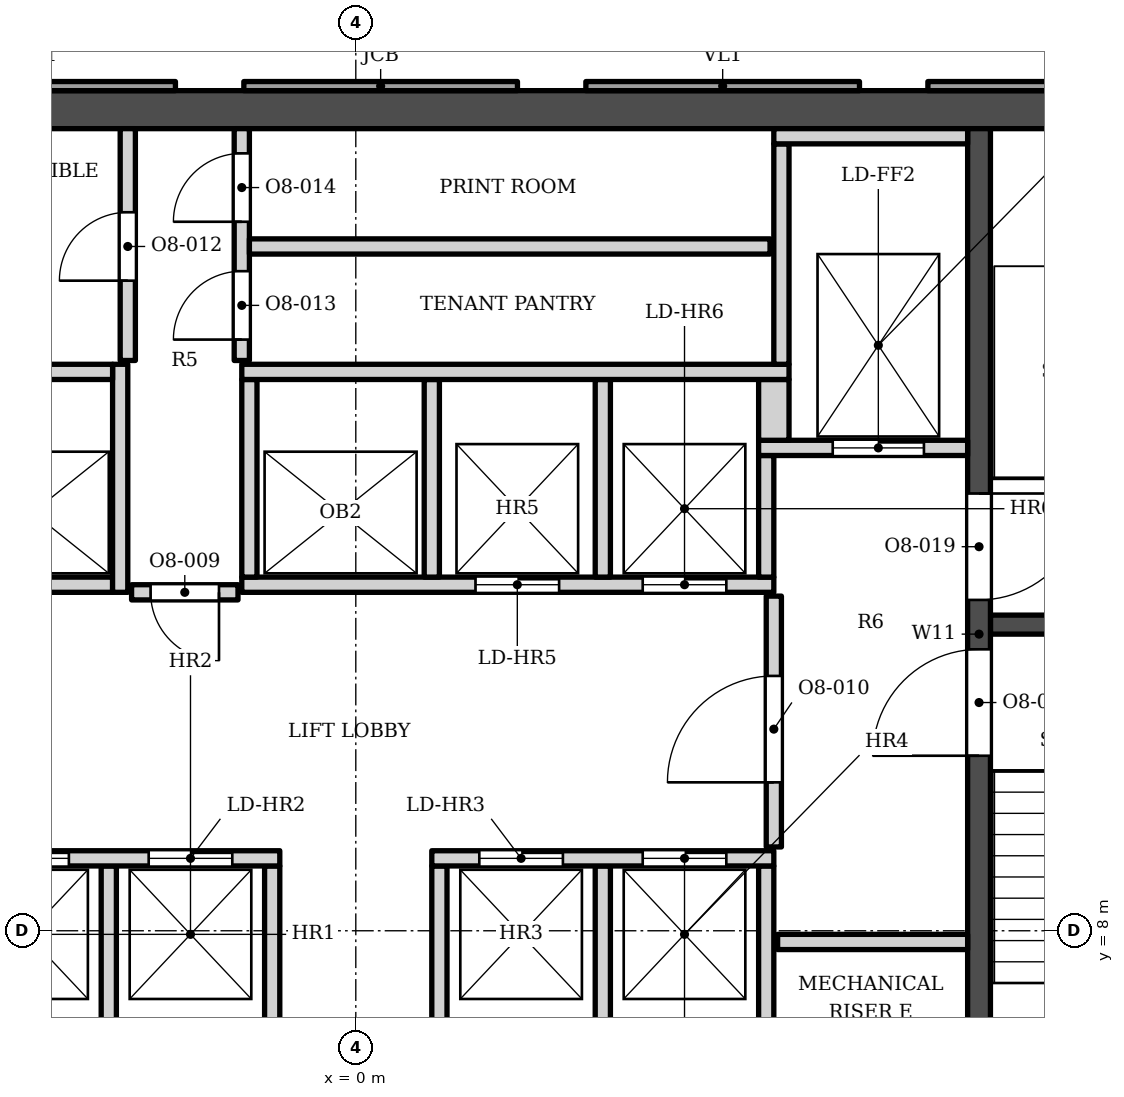
"""IFC4 building model, lengths in metres.
Left out: names, types, materials, properties, quantities, classifications, styles, units other than length and angle.
Written with IfcOpenShell. Run it as: python <this file> out.ifc"""

import sys

from ifc_helpers import new_model, si_unit, direction, frame, frame_2d, origin, place, context, subcontext, project, spatial, polyline, rectangle, outline, extrude, element, fill, save


model = new_model("IFC4")
c1 = context("Model", 3, precision=1e-05, world=origin(), true_north=direction((0.0, 1.0)))
c2 = subcontext(c1, "Body", "Model", "MODEL_VIEW")
j1 = project(units=[si_unit("LENGTHUNIT", "METRE"), si_unit("PLANEANGLEUNIT", "RADIAN")], contexts=[c1])
p1 = place(None, origin())
s1 = spatial("IfcSite", under=j1, at=p1, CompositionType="ELEMENT")
p2 = place(p1, origin())
s2 = spatial("IfcBuilding", under=s1, at=p2, CompositionType="ELEMENT")
p3 = place(p2, frame((0.0, 0.0, 231.5)))
s3 = spatial("IfcBuildingStorey", under=s2, at=p3, CompositionType="ELEMENT", Elevation=231.5)
p4 = place(p3, frame((-13.9, 18.802, 0.0), z_axis=(0.0, 0.0, 1.0), x_axis=(1.0, 0.0, 0.0)))
e1 = element("IfcWall", 1, at=p4, inside=s3, PredefinedType="SHEAR", context=c2, shape_type="SweptSolid", body=[
    extrude(rectangle(XDim=27.8, YDim=0.5, at=frame_2d((13.9, 0.0))), origin(), (0.0, 0.0, 1.0), 3.9),
])
p5 = place(p3, frame((8.2, 5.253, 0.0), z_axis=(0.0, 0.0, 1.0), x_axis=(0.0, 1.0, 0.0)))
e2 = element("IfcWall", 2, at=p5, inside=s3, PredefinedType="SHEAR", context=c2, shape_type="SweptSolid", body=[
    extrude(rectangle(XDim=13.3, YDim=0.3, at=frame_2d((6.65, 0.0))), origin(), (0.0, 0.0, 1.0), 3.9),
])
p6 = place(p5, frame((7.1, 0.0, 0.0)))
e3 = element("IfcOpeningElement", 3, at=p6, cuts=e2, PredefinedType="OPENING", context=c2, shape_type="SweptSolid", body=[
    extrude(rectangle(XDim=1.4, YDim=2.1, at=frame_2d((0.7, 1.05))), frame((0.0, 0.16, 0.0), z_axis=(0.0, -1.0, 0.0), x_axis=(1.0, 0.0, 0.0)), (0.0, 0.0, 1.0), 0.32),
])
p7 = place(p5, frame((5.05, 0.0, 0.0)))
e4 = element("IfcOpeningElement", 4, at=p7, cuts=e2, PredefinedType="OPENING", context=c2, shape_type="SweptSolid", body=[
    extrude(rectangle(XDim=1.4, YDim=2.1, at=frame_2d((0.7, 1.05))), frame((0.0, 0.16, 0.0), z_axis=(0.0, -1.0, 0.0), x_axis=(1.0, 0.0, 0.0)), (0.0, 0.0, 1.0), 0.32),
])
p8 = place(p3, frame((8.35, 12.028, 0.0), z_axis=(0.0, 0.0, 1.0), x_axis=(1.0, 0.0, 0.0)))
e5 = element("IfcWall", 5, at=p8, inside=s3, PredefinedType="SHEAR", context=c2, shape_type="SweptSolid", body=[
    extrude(rectangle(XDim=3.75, YDim=0.25, at=frame_2d((1.875, 0.0))), origin(), (0.0, 0.0, 1.0), 3.9),
])
p9 = place(p3, origin())
e6 = element("IfcWall", 6, at=p9, inside=s3, PredefinedType="SOLIDWALL", context=c2, shape_type="SweptSolid", body=[
    extrude(outline(polyline([(7.527, 19.173), (7.527, 19.052), (11.127, 19.052), (11.127, 19.173), (7.527, 19.173)])), origin(), (0.0, 0.0, 1.0), 3.0),
])
p10 = place(p3, origin())
e7 = element("IfcWall", 7, at=p10, inside=s3, PredefinedType="ELEMENTEDWALL", context=c2, shape_type="SweptSolid", body=[
    extrude(outline(polyline([(3.027, 19.173), (3.027, 19.052), (6.627, 19.052), (6.627, 19.173), (3.027, 19.173)])), origin(), (0.0, 0.0, 1.0), 3.0),
])
p11 = place(p3, origin())
e8 = element("IfcWall", 8, at=p11, inside=s3, PredefinedType="SOLIDWALL", context=c2, shape_type="SweptSolid", body=[
    extrude(outline(polyline([(-1.473, 19.173), (-1.473, 19.052), (2.127, 19.052), (2.127, 19.173), (-1.473, 19.173)])), origin(), (0.0, 0.0, 1.0), 3.0),
])
p12 = place(p3, origin())
e9 = element("IfcWall", 9, at=p12, inside=s3, PredefinedType="ELEMENTEDWALL", context=c2, shape_type="SweptSolid", body=[
    extrude(outline(polyline([(-5.973, 19.173), (-5.973, 19.052), (-2.373, 19.052), (-2.373, 19.173), (-5.973, 19.173)])), origin(), (0.0, 0.0, 1.0), 3.0),
])
for number, where, z_axis, x_axis in (
    (10, (-3.25, 6.353, 0.0), (0.0, 0.0, 1.0), (0.0, 1.0, 0.0)),
    (11, (-1.1, 6.353, 0.0), (0.0, 0.0, 1.0), (0.0, 1.0, 0.0)),
    (12, (1.1, 6.353, 0.0), (0.0, 0.0, 1.0), (0.0, 1.0, 0.0)),
    (13, (3.25, 6.353, 0.0), (0.0, 0.0, 1.0), (0.0, 1.0, 0.0)),
    (14, (5.4, 6.353, 0.0), (0.0, 0.0, 1.0), (0.0, 1.0, 0.0)),
    (15, (5.55, 7.853, 0.0), (0.0, 0.0, 1.0), (1.0, 0.0, 0.0)),
):
    element("IfcWall", number, at=place(p3, frame(where, z_axis=z_axis, x_axis=x_axis)), inside=s3, PredefinedType="SOLIDWALL", context=c2, shape_type="SweptSolid", body=[
        extrude(rectangle(XDim=2.5, YDim=0.2, at=frame_2d((1.25, 0.0))), origin(), (0.0, 0.0, 1.0), 3.73),
    ])
p13 = place(p3, frame((-5.5, 8.953, 0.0), z_axis=(0.0, 0.0, 1.0), x_axis=(1.0, 0.0, 0.0)))
e16 = element("IfcWall", 16, at=p13, inside=s3, PredefinedType="SOLIDWALL", context=c2, shape_type="SweptSolid", body=[
    extrude(rectangle(XDim=4.5, YDim=0.2, at=frame_2d((2.25, 0.0))), origin(), (0.0, 0.0, 1.0), 3.73),
])
p14 = place(p13, frame((0.625, 0.0, 0.0)))
e17 = element("IfcOpeningElement", 17, at=p14, cuts=e16, PredefinedType="OPENING", context=c2, shape_type="SweptSolid", body=[
    extrude(rectangle(XDim=1.1, YDim=2.1, at=frame_2d((0.55, 1.05))), frame((0.0, 0.11, 0.0), z_axis=(0.0, -1.0, 0.0), x_axis=(1.0, 0.0, 0.0)), (0.0, 0.0, 1.0), 0.22),
])
p15 = place(p13, frame((2.775, 0.0, 0.0)))
e18 = element("IfcOpeningElement", 18, at=p15, cuts=e16, PredefinedType="OPENING", context=c2, shape_type="SweptSolid", body=[
    extrude(rectangle(XDim=1.1, YDim=2.1, at=frame_2d((0.55, 1.05))), frame((0.0, 0.11, 0.0), z_axis=(0.0, -1.0, 0.0), x_axis=(1.0, 0.0, 0.0)), (0.0, 0.0, 1.0), 0.22),
])
p16 = place(p3, frame((1.0, 8.953, 0.0), z_axis=(0.0, 0.0, 1.0), x_axis=(1.0, 0.0, 0.0)))
e19 = element("IfcWall", 19, at=p16, inside=s3, PredefinedType="SOLIDWALL", context=c2, shape_type="SweptSolid", body=[
    extrude(rectangle(XDim=4.5, YDim=0.2, at=frame_2d((2.25, 0.0))), origin(), (0.0, 0.0, 1.0), 3.73),
])
p17 = place(p16, frame((0.625, 0.0, 0.0)))
e20 = element("IfcOpeningElement", 20, at=p17, cuts=e19, PredefinedType="OPENING", context=c2, shape_type="SweptSolid", body=[
    extrude(rectangle(XDim=1.1, YDim=2.1, at=frame_2d((0.55, 1.05))), frame((0.0, 0.11, 0.0), z_axis=(0.0, -1.0, 0.0), x_axis=(1.0, 0.0, 0.0)), (0.0, 0.0, 1.0), 0.22),
])
p18 = place(p16, frame((2.775, 0.0, 0.0)))
e21 = element("IfcOpeningElement", 21, at=p18, cuts=e19, PredefinedType="OPENING", context=c2, shape_type="SweptSolid", body=[
    extrude(rectangle(XDim=1.1, YDim=2.1, at=frame_2d((0.55, 1.05))), frame((0.0, 0.11, 0.0), z_axis=(0.0, -1.0, 0.0), x_axis=(1.0, 0.0, 0.0)), (0.0, 0.0, 1.0), 0.22),
])
p19 = place(p3, frame((5.5, 9.103, 0.0), z_axis=(0.0, 0.0, 1.0), x_axis=(0.0, 1.0, 0.0)))
e22 = element("IfcWall", 22, at=p19, inside=s3, PredefinedType="SOLIDWALL", context=c2, shape_type="SweptSolid", body=[
    extrude(rectangle(XDim=3.3, YDim=0.2, at=frame_2d((1.65, 0.0))), origin(), (0.0, 0.0, 1.0), 3.73),
])
p20 = place(p19, frame((0.85, 0.0, 0.0)))
e23 = element("IfcOpeningElement", 23, at=p20, cuts=e22, PredefinedType="OPENING", context=c2, shape_type="SweptSolid", body=[
    extrude(rectangle(XDim=1.4, YDim=2.1, at=frame_2d((0.7, 1.05))), frame((0.0, 0.11, 0.0), z_axis=(0.0, -1.0, 0.0), x_axis=(1.0, 0.0, 0.0)), (0.0, 0.0, 1.0), 0.22),
])
p21 = place(p3, frame((-2.95, 12.453, 0.0), z_axis=(0.0, 0.0, 1.0), x_axis=(1.0, 0.0, 0.0)))
e24 = element("IfcWall", 24, at=p21, inside=s3, PredefinedType="SOLIDWALL", context=c2, shape_type="SweptSolid", body=[
    extrude(rectangle(XDim=1.4, YDim=0.2, at=frame_2d((0.7, 0.0))), origin(), (0.0, 0.0, 1.0), 3.73),
])
p22 = place(p21, frame((0.25, 0.0, 0.0)))
e25 = element("IfcOpeningElement", 25, at=p22, cuts=e24, PredefinedType="OPENING", context=c2, shape_type="SweptSolid", body=[
    extrude(rectangle(XDim=0.9, YDim=2.1, at=frame_2d((0.45, 1.05))), frame((0.0, 0.11, 0.0), z_axis=(0.0, -1.0, 0.0), x_axis=(1.0, 0.0, 0.0)), (0.0, 0.0, 1.0), 0.22),
])
p23 = place(p3, frame((-5.3, 12.552, 0.0), z_axis=(0.0, 0.0, 1.0), x_axis=(1.0, 0.0, 0.0)))
e26 = element("IfcWall", 26, at=p23, inside=s3, PredefinedType="SOLIDWALL", context=c2, shape_type="SweptSolid", body=[
    extrude(rectangle(XDim=2.1, YDim=0.2, at=frame_2d((1.05, 0.0))), origin(), (0.0, 0.0, 1.0), 3.73),
])
p24 = place(p3, frame((-3.1, 12.453, 0.0), z_axis=(0.0, 0.0, 1.0), x_axis=(0.0, 1.0, 0.0)))
e27 = element("IfcWall", 27, at=p24, inside=s3, PredefinedType="SOLIDWALL", context=c2, shape_type="SweptSolid", body=[
    extrude(rectangle(XDim=3.0, YDim=0.2, at=frame_2d((1.5, 0.0))), origin(), (0.0, 0.0, 1.0), 3.73),
])
p25 = place(p3, frame((-1.5, 12.552, 0.0), z_axis=(0.0, 0.0, 1.0), x_axis=(1.0, 0.0, 0.0)))
e28 = element("IfcWall", 28, at=p25, inside=s3, PredefinedType="SOLIDWALL", context=c2, shape_type="SweptSolid", body=[
    extrude(rectangle(XDim=7.0, YDim=0.2, at=frame_2d((3.5, 0.0))), origin(), (0.0, 0.0, 1.0), 3.73),
])
p26 = place(p25, frame((3.075, 0.0, 0.0)))
e29 = element("IfcOpeningElement", 29, at=p26, cuts=e28, PredefinedType="OPENING", context=c2, shape_type="SweptSolid", body=[
    extrude(rectangle(XDim=1.1, YDim=2.1, at=frame_2d((0.55, 1.05))), frame((0.0, 0.11, 0.0), z_axis=(0.0, -1.0, 0.0), x_axis=(1.0, 0.0, 0.0)), (0.0, 0.0, 1.0), 0.22),
])
p27 = place(p25, frame((5.275, 0.0, 0.0)))
e30 = element("IfcOpeningElement", 30, at=p27, cuts=e28, PredefinedType="OPENING", context=c2, shape_type="SweptSolid", body=[
    extrude(rectangle(XDim=1.1, YDim=2.1, at=frame_2d((0.55, 1.05))), frame((0.0, 0.11, 0.0), z_axis=(0.0, -1.0, 0.0), x_axis=(1.0, 0.0, 0.0)), (0.0, 0.0, 1.0), 0.22),
])
for number, where, z_axis, x_axis in (
    (31, (-1.4, 12.653, 0.0), (0.0, 0.0, 1.0), (0.0, 1.0, 0.0)),
    (32, (1.0, 12.653, 0.0), (0.0, 0.0, 1.0), (0.0, 1.0, 0.0)),
    (33, (3.25, 12.653, 0.0), (0.0, 0.0, 1.0), (0.0, 1.0, 0.0)),
):
    element("IfcWall", number, at=place(p3, frame(where, z_axis=z_axis, x_axis=x_axis)), inside=s3, PredefinedType="SOLIDWALL", context=c2, shape_type="SweptSolid", body=[
        extrude(rectangle(XDim=2.6, YDim=0.2, at=frame_2d((1.3, 0.0))), origin(), (0.0, 0.0, 1.0), 3.73),
    ])
p28 = place(p3, frame((5.4, 12.653, 0.0), z_axis=(0.0, 0.0, 1.0), x_axis=(0.0, 1.0, 0.0)))
e34 = element("IfcWall", 34, at=p28, inside=s3, PredefinedType="SOLIDWALL", context=c2, shape_type="SweptSolid", body=[
    extrude(rectangle(XDim=1.6, YDim=0.2, at=frame_2d((0.8, 0.0))), origin(), (0.0, 0.0, 1.0), 3.73),
])
p29 = place(p3, frame((5.3, 14.353, 0.0), z_axis=(0.0, 0.0, 1.0), x_axis=(1.0, 0.0, 0.0)))
e35 = element("IfcWall", 35, at=p29, inside=s3, PredefinedType="SOLIDWALL", context=c2, shape_type="SweptSolid", body=[
    extrude(rectangle(XDim=2.75, YDim=0.2, at=frame_2d((1.375, 0.0))), origin(), (0.0, 0.0, 1.0), 3.73),
])
p30 = place(p29, frame((0.975, 0.0, 0.0)))
e36 = element("IfcOpeningElement", 36, at=p30, cuts=e35, PredefinedType="OPENING", context=c2, shape_type="SweptSolid", body=[
    extrude(rectangle(XDim=1.2, YDim=2.1, at=frame_2d((0.6, 1.05))), frame((0.0, 0.11, 0.0), z_axis=(0.0, -1.0, 0.0), x_axis=(1.0, 0.0, 0.0)), (0.0, 0.0, 1.0), 0.22),
])
p31 = place(p3, frame((5.5, 14.453, 0.0), z_axis=(0.0, 0.0, 1.0), x_axis=(0.0, 1.0, 0.0)))
e37 = element("IfcWall", 37, at=p31, inside=s3, PredefinedType="SOLIDWALL", context=c2, shape_type="SweptSolid", body=[
    extrude(rectangle(XDim=0.8, YDim=0.4, at=frame_2d((0.4, 0.0))), origin(), (0.0, 0.0, 1.0), 3.73),
])
p32 = place(p3, frame((-5.3, 15.353, 0.0), z_axis=(0.0, 0.0, 1.0), x_axis=(1.0, 0.0, 0.0)))
e38 = element("IfcWall", 38, at=p32, inside=s3, PredefinedType="SOLIDWALL", context=c2, shape_type="SweptSolid", body=[
    extrude(rectangle(XDim=2.1, YDim=0.2, at=frame_2d((1.05, 0.0))), origin(), (0.0, 0.0, 1.0), 3.73),
])
p33 = place(p3, frame((-1.5, 15.353, 0.0), z_axis=(0.0, 0.0, 1.0), x_axis=(1.0, 0.0, 0.0)))
e39 = element("IfcWall", 39, at=p33, inside=s3, PredefinedType="SOLIDWALL", context=c2, shape_type="SweptSolid", body=[
    extrude(rectangle(XDim=7.2, YDim=0.2, at=frame_2d((3.6, 0.0))), origin(), (0.0, 0.0, 1.0), 3.73),
])
p34 = place(p3, frame((5.6, 15.453, 0.0), z_axis=(0.0, 0.0, 1.0), x_axis=(0.0, 1.0, 0.0)))
e40 = element("IfcWall", 40, at=p34, inside=s3, PredefinedType="SOLIDWALL", context=c2, shape_type="SweptSolid", body=[
    extrude(rectangle(XDim=2.9, YDim=0.2, at=frame_2d((1.45, 0.0))), origin(), (0.0, 0.0, 1.0), 3.73),
])
p35 = place(p3, frame((-3.0, 15.503, 0.0), z_axis=(0.0, 0.0, 1.0), x_axis=(0.0, 1.0, 0.0)))
e41 = element("IfcWall", 41, at=p35, inside=s3, PredefinedType="SOLIDWALL", context=c2, shape_type="SweptSolid", body=[
    extrude(rectangle(XDim=3.05, YDim=0.2, at=frame_2d((1.525, 0.0))), origin(), (0.0, 0.0, 1.0), 3.73),
])
p36 = place(p35, frame((1.05, 0.0, 0.0)))
e42 = element("IfcOpeningElement", 42, at=p36, cuts=e41, PredefinedType="OPENING", context=c2, shape_type="SweptSolid", body=[
    extrude(rectangle(XDim=0.9, YDim=2.1, at=frame_2d((0.45, 1.05))), frame((0.0, 0.11, 0.0), z_axis=(0.0, -1.0, 0.0), x_axis=(1.0, 0.0, 0.0)), (0.0, 0.0, 1.0), 0.22),
])
p37 = place(p3, frame((-1.5, 15.503, 0.0), z_axis=(0.0, 0.0, 1.0), x_axis=(0.0, 1.0, 0.0)))
e43 = element("IfcWall", 43, at=p37, inside=s3, PredefinedType="SOLIDWALL", context=c2, shape_type="SweptSolid", body=[
    extrude(rectangle(XDim=3.05, YDim=0.2, at=frame_2d((1.525, 0.0))), origin(), (0.0, 0.0, 1.0), 3.73),
])
p38 = place(p37, frame((0.275, 0.0, 0.0)))
e44 = element("IfcOpeningElement", 44, at=p38, cuts=e43, PredefinedType="OPENING", context=c2, shape_type="SweptSolid", body=[
    extrude(rectangle(XDim=0.9, YDim=2.1, at=frame_2d((0.45, 1.05))), frame((0.0, 0.11, 0.0), z_axis=(0.0, -1.0, 0.0), x_axis=(1.0, 0.0, 0.0)), (0.0, 0.0, 1.0), 0.22),
])
p39 = place(p37, frame((1.825, 0.0, 0.0)))
e45 = element("IfcOpeningElement", 45, at=p39, cuts=e43, PredefinedType="OPENING", context=c2, shape_type="SweptSolid", body=[
    extrude(rectangle(XDim=0.9, YDim=2.1, at=frame_2d((0.45, 1.05))), frame((0.0, 0.11, 0.0), z_axis=(0.0, -1.0, 0.0), x_axis=(1.0, 0.0, 0.0)), (0.0, 0.0, 1.0), 0.22),
])
p40 = place(p3, frame((-1.4, 17.003, 0.0), z_axis=(0.0, 0.0, 1.0), x_axis=(1.0, 0.0, 0.0)))
e46 = element("IfcWall", 46, at=p40, inside=s3, PredefinedType="SOLIDWALL", context=c2, shape_type="SweptSolid", body=[
    extrude(rectangle(XDim=6.85, YDim=0.2, at=frame_2d((3.425, 0.0))), origin(), (0.0, 0.0, 1.0), 3.73),
])
p41 = place(p3, frame((5.5, 18.453, 0.0), z_axis=(0.0, 0.0, 1.0), x_axis=(1.0, 0.0, 0.0)))
e47 = element("IfcWall", 47, at=p41, inside=s3, PredefinedType="SOLIDWALL", context=c2, shape_type="SweptSolid", body=[
    extrude(rectangle(XDim=2.55, YDim=0.2, at=frame_2d((1.275, 0.0))), origin(), (0.0, 0.0, 1.0), 3.73),
])
p42 = place(p14, origin())
e48 = element("IfcDoor", 48, at=p42, inside=s3, OperationType="DOUBLE_DOOR_SLIDING", PredefinedType="DOOR", context=c2, shape_type="SweptSolid", body=[
    extrude(rectangle(XDim=1.1, YDim=2.1, at=frame_2d((0.55, 1.05))), frame((0.0, 0.025, 0.0), z_axis=(0.0, -1.0, 0.0), x_axis=(1.0, 0.0, 0.0)), (0.0, 0.0, 1.0), 0.05),
])
fill(e17, e48)
p43 = place(p15, origin())
e49 = element("IfcDoor", 49, at=p43, inside=s3, OperationType="DOUBLE_DOOR_SLIDING", PredefinedType="DOOR", context=c2, shape_type="SweptSolid", body=[
    extrude(rectangle(XDim=1.1, YDim=2.1, at=frame_2d((0.55, 1.05))), frame((0.0, 0.025, 0.0), z_axis=(0.0, -1.0, 0.0), x_axis=(1.0, 0.0, 0.0)), (0.0, 0.0, 1.0), 0.05),
])
fill(e18, e49)
p44 = place(p17, origin())
e50 = element("IfcDoor", 50, at=p44, inside=s3, OperationType="DOUBLE_DOOR_SLIDING", PredefinedType="DOOR", context=c2, shape_type="SweptSolid", body=[
    extrude(rectangle(XDim=1.1, YDim=2.1, at=frame_2d((0.55, 1.05))), frame((0.0, 0.025, 0.0), z_axis=(0.0, -1.0, 0.0), x_axis=(1.0, 0.0, 0.0)), (0.0, 0.0, 1.0), 0.05),
])
fill(e20, e50)
p45 = place(p18, origin())
e51 = element("IfcDoor", 51, at=p45, inside=s3, OperationType="DOUBLE_DOOR_SLIDING", PredefinedType="DOOR", context=c2, shape_type="SweptSolid", body=[
    extrude(rectangle(XDim=1.1, YDim=2.1, at=frame_2d((0.55, 1.05))), frame((0.0, 0.025, 0.0), z_axis=(0.0, -1.0, 0.0), x_axis=(1.0, 0.0, 0.0)), (0.0, 0.0, 1.0), 0.05),
])
fill(e21, e51)
p46 = place(p26, origin())
e52 = element("IfcDoor", 52, at=p46, inside=s3, OperationType="DOUBLE_DOOR_SLIDING", PredefinedType="DOOR", context=c2, shape_type="SweptSolid", body=[
    extrude(rectangle(XDim=1.1, YDim=2.1, at=frame_2d((0.55, 1.05))), frame((0.0, 0.025, 0.0), z_axis=(0.0, -1.0, 0.0), x_axis=(1.0, 0.0, 0.0)), (0.0, 0.0, 1.0), 0.05),
])
fill(e29, e52)
p47 = place(p27, origin())
e53 = element("IfcDoor", 53, at=p47, inside=s3, OperationType="DOUBLE_DOOR_SLIDING", PredefinedType="DOOR", context=c2, shape_type="SweptSolid", body=[
    extrude(rectangle(XDim=1.1, YDim=2.1, at=frame_2d((0.55, 1.05))), frame((0.0, 0.025, 0.0), z_axis=(0.0, -1.0, 0.0), x_axis=(1.0, 0.0, 0.0)), (0.0, 0.0, 1.0), 0.05),
])
fill(e30, e53)
p48 = place(p30, origin())
e54 = element("IfcDoor", 54, at=p48, inside=s3, OperationType="DOUBLE_DOOR_SLIDING", PredefinedType="DOOR", context=c2, shape_type="SweptSolid", body=[
    extrude(rectangle(XDim=1.2, YDim=2.1, at=frame_2d((0.6, 1.05))), frame((0.0, 0.025, 0.0), z_axis=(0.0, -1.0, 0.0), x_axis=(1.0, 0.0, 0.0)), (0.0, 0.0, 1.0), 0.05),
])
fill(e36, e54)
p49 = place(p6, origin())
e55 = element("IfcDoor", 55, at=p49, inside=s3, OperationType="SINGLE_SWING_RIGHT", PredefinedType="DOOR", context=c2, shape_type="SweptSolid", body=[
    extrude(rectangle(XDim=1.4, YDim=2.1, at=frame_2d((0.7, 1.05))), frame((0.0, 0.025, 0.0), z_axis=(0.0, -1.0, 0.0), x_axis=(1.0, 0.0, 0.0)), (0.0, 0.0, 1.0), 0.05),
])
fill(e3, e55)
p50 = place(p7, origin())
e56 = element("IfcDoor", 56, at=p50, inside=s3, OperationType="SINGLE_SWING_LEFT", PredefinedType="DOOR", context=c2, shape_type="SweptSolid", body=[
    extrude(rectangle(XDim=1.4, YDim=2.1, at=frame_2d((0.7, 1.05))), frame((0.0, 0.025, 0.0), z_axis=(0.0, -1.0, 0.0), x_axis=(1.0, 0.0, 0.0)), (0.0, 0.0, 1.0), 0.05),
])
fill(e4, e56)
p51 = place(p22, origin())
e57 = element("IfcDoor", 57, at=p51, inside=s3, OperationType="SINGLE_SWING_RIGHT", PredefinedType="DOOR", context=c2, shape_type="SweptSolid", body=[
    extrude(rectangle(XDim=0.9, YDim=2.1, at=frame_2d((0.45, 1.05))), frame((0.0, 0.025, 0.0), z_axis=(0.0, -1.0, 0.0), x_axis=(1.0, 0.0, 0.0)), (0.0, 0.0, 1.0), 0.05),
])
fill(e25, e57)
p52 = place(p20, origin())
e58 = element("IfcDoor", 58, at=p52, inside=s3, OperationType="SINGLE_SWING_LEFT", PredefinedType="DOOR", context=c2, shape_type="SweptSolid", body=[
    extrude(rectangle(XDim=1.4, YDim=2.1, at=frame_2d((0.7, 1.05))), frame((0.0, 0.025, 0.0), z_axis=(0.0, -1.0, 0.0), x_axis=(1.0, 0.0, 0.0)), (0.0, 0.0, 1.0), 0.05),
])
fill(e23, e58)
p53 = place(p36, origin())
e59 = element("IfcDoor", 59, at=p53, inside=s3, OperationType="SINGLE_SWING_LEFT", PredefinedType="DOOR", context=c2, shape_type="SweptSolid", body=[
    extrude(rectangle(XDim=0.9, YDim=2.1, at=frame_2d((0.45, 1.05))), frame((0.0, 0.025, 0.0), z_axis=(0.0, -1.0, 0.0), x_axis=(1.0, 0.0, 0.0)), (0.0, 0.0, 1.0), 0.05),
])
fill(e42, e59)
p54 = place(p38, origin())
e60 = element("IfcDoor", 60, at=p54, inside=s3, OperationType="SINGLE_SWING_LEFT", PredefinedType="DOOR", context=c2, shape_type="SweptSolid", body=[
    extrude(rectangle(XDim=0.9, YDim=2.1, at=frame_2d((0.45, 1.05))), frame((0.0, 0.025, 0.0), z_axis=(0.0, -1.0, 0.0), x_axis=(1.0, 0.0, 0.0)), (0.0, 0.0, 1.0), 0.05),
])
fill(e44, e60)
p55 = place(p39, origin())
e61 = element("IfcDoor", 61, at=p55, inside=s3, OperationType="SINGLE_SWING_LEFT", PredefinedType="DOOR", context=c2, shape_type="SweptSolid", body=[
    extrude(rectangle(XDim=0.9, YDim=2.1, at=frame_2d((0.45, 1.05))), frame((0.0, 0.025, 0.0), z_axis=(0.0, -1.0, 0.0), x_axis=(1.0, 0.0, 0.0)), (0.0, 0.0, 1.0), 0.05),
])
fill(e45, e61)
save(model, sys.argv[1])
